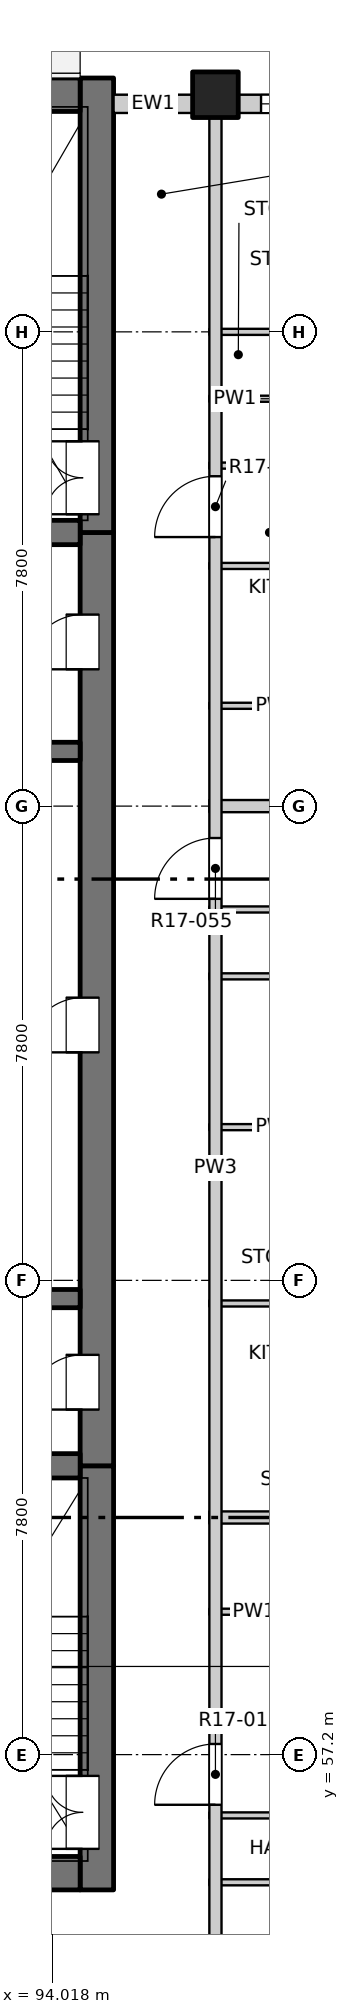
"""IFC4 building model, lengths in metres.
Left out: names, types, materials, properties, quantities, classifications, styles, units other than length and angle.
Written with IfcOpenShell. Run it as: python <this file> out.ifc"""

import sys

from ifc_helpers import new_model, si_unit, direction, frame, frame_2d, origin, origin_2d, place, context, subcontext, project, spatial, rectangle, extrude, element, fill, save


model = new_model("IFC4")
c1 = context("Model", 3, precision=1e-05, world=origin(), true_north=direction((0.0, 1.0)))
c2 = subcontext(c1, "Body", "Model", "MODEL_VIEW")
j1 = project(units=[si_unit("LENGTHUNIT", "METRE"), si_unit("PLANEANGLEUNIT", "RADIAN")], contexts=[c1])
p1 = place(None, origin())
s1 = spatial("IfcSite", under=j1, at=p1, CompositionType="ELEMENT")
p2 = place(p1, origin())
s2 = spatial("IfcBuilding", under=s1, at=p2, CompositionType="ELEMENT")
p3 = place(p2, frame((0.0, 0.0, 182.6)))
s3 = spatial("IfcBuildingStorey", under=s2, at=p3, CompositionType="ELEMENT", Elevation=182.6)
p4 = place(p3, frame((96.7, 84.5, -0.25), z_axis=(0.0, 0.0, 1.0), x_axis=(1.0, 0.0, 0.0)))
e1 = element("IfcColumn", 1, at=p4, inside=s3, PredefinedType="COLUMN", context=c2, shape_type="SweptSolid", body=[
    extrude(rectangle(XDim=0.75, YDim=0.75, at=origin_2d()), origin(), (0.0, 0.0, 1.0), 3.4),
])
p5 = place(p3, frame((94.75, 54.975, -0.25), z_axis=(0.0, 0.0, 1.0), x_axis=(0.0, 1.0, 0.0)))
e2 = element("IfcWall", 2, at=p5, inside=s3, PredefinedType="SOLIDWALL", context=c2, shape_type="SweptSolid", body=[
    extrude(rectangle(XDim=6.975, YDim=0.55, at=frame_2d((3.487, 0.0))), origin(), (0.0, 0.0, 1.0), 3.4),
])
p6 = place(p5, frame((0.675, 0.0, 0.25)))
e3 = element("IfcOpeningElement", 3, at=p6, cuts=e2, PredefinedType="OPENING", context=c2, shape_type="SweptSolid", body=[
    extrude(rectangle(XDim=1.2, YDim=2.1, at=frame_2d((0.6, 1.05))), frame((0.0, 0.285, 0.0), z_axis=(0.0, -1.0, 0.0), x_axis=(1.0, 0.0, 0.0)), (0.0, 0.0, 1.0), 0.57),
])
p7 = place(p3, frame((94.75, 61.95, -0.25), z_axis=(0.0, 0.0, 1.0), x_axis=(0.0, 1.0, 0.0)))
e4 = element("IfcWall", 4, at=p7, inside=s3, PredefinedType="SOLIDWALL", context=c2, shape_type="SweptSolid", body=[
    extrude(rectangle(XDim=15.35, YDim=0.55, at=frame_2d((7.675, 0.0))), origin(), (0.0, 0.0, 1.0), 3.4),
])
p8 = place(p7, frame((0.925, 0.0, 0.25)))
e5 = element("IfcOpeningElement", 5, at=p8, cuts=e4, PredefinedType="OPENING", context=c2, shape_type="SweptSolid", body=[
    extrude(rectangle(XDim=0.9, YDim=2.1, at=frame_2d((0.45, 1.05))), frame((0.0, 0.285, 0.0), z_axis=(0.0, -1.0, 0.0), x_axis=(1.0, 0.0, 0.0)), (0.0, 0.0, 1.0), 0.57),
])
p9 = place(p7, frame((6.8, 0.0, 0.25)))
e6 = element("IfcOpeningElement", 6, at=p9, cuts=e4, PredefinedType="OPENING", context=c2, shape_type="SweptSolid", body=[
    extrude(rectangle(XDim=0.9, YDim=2.1, at=frame_2d((0.45, 1.05))), frame((0.0, 0.285, 0.0), z_axis=(0.0, -1.0, 0.0), x_axis=(1.0, 0.0, 0.0)), (0.0, 0.0, 1.0), 0.57),
])
p10 = place(p7, frame((13.1, 0.0, 0.25)))
e7 = element("IfcOpeningElement", 7, at=p10, cuts=e4, PredefinedType="OPENING", context=c2, shape_type="SweptSolid", body=[
    extrude(rectangle(XDim=0.9, YDim=2.1, at=frame_2d((0.45, 1.05))), frame((0.0, 0.285, 0.0), z_axis=(0.0, -1.0, 0.0), x_axis=(1.0, 0.0, 0.0)), (0.0, 0.0, 1.0), 0.57),
])
p11 = place(p3, frame((94.75, 77.3, -0.25), z_axis=(0.0, 0.0, 1.0), x_axis=(0.0, 1.0, 0.0)))
e8 = element("IfcWall", 8, at=p11, inside=s3, PredefinedType="SOLIDWALL", context=c2, shape_type="SweptSolid", body=[
    extrude(rectangle(XDim=7.475, YDim=0.55, at=frame_2d((3.737, 0.0))), origin(), (0.0, 0.0, 1.0), 3.4),
])
p12 = place(p11, frame((0.3, 0.0, 0.25)))
e9 = element("IfcOpeningElement", 9, at=p12, cuts=e8, PredefinedType="OPENING", context=c2, shape_type="SweptSolid", body=[
    extrude(rectangle(XDim=1.2, YDim=2.1, at=frame_2d((0.6, 1.05))), frame((0.0, 0.285, 0.0), z_axis=(0.0, -1.0, 0.0), x_axis=(1.0, 0.0, 0.0)), (0.0, 0.0, 1.0), 0.57),
])
p13 = place(p3, frame((75.525, 55.25, -0.25), z_axis=(0.0, 0.0, 1.0), x_axis=(1.0, 0.0, 0.0)))
e10 = element("IfcWall", 10, at=p13, inside=s3, PredefinedType="SOLIDWALL", context=c2, shape_type="SweptSolid", body=[
    extrude(rectangle(XDim=18.95, YDim=0.55, at=frame_2d((9.475, 0.0))), origin(), (0.0, 0.0, 1.0), 3.4),
])
p14 = place(p13, frame((8.725, 0.0, 0.25)))
e11 = element("IfcOpeningElement", 11, at=p14, cuts=e10, PredefinedType="OPENING", context=c2, shape_type="SweptSolid", body=[
    extrude(rectangle(XDim=1.5, YDim=2.1, at=frame_2d((0.75, 1.05))), frame((0.0, 0.285, 0.0), z_axis=(0.0, -1.0, 0.0), x_axis=(1.0, 0.0, 0.0)), (0.0, 0.0, 1.0), 0.57),
])
p15 = place(p3, frame((75.525, 84.5, -0.25), z_axis=(0.0, 0.0, 1.0), x_axis=(1.0, 0.0, 0.0)))
e12 = element("IfcWall", 12, at=p15, inside=s3, PredefinedType="SOLIDWALL", context=c2, shape_type="SweptSolid", body=[
    extrude(rectangle(XDim=18.95, YDim=0.55, at=frame_2d((9.475, 0.0))), origin(), (0.0, 0.0, 1.0), 3.4),
])
p16 = place(p3, frame((90.7, 61.95, -0.25), z_axis=(0.0, 0.0, 1.0), x_axis=(1.0, 0.0, 0.0)))
e13 = element("IfcWall", 13, at=p16, inside=s3, PredefinedType="SOLIDWALL", context=c2, shape_type="SweptSolid", body=[
    extrude(rectangle(XDim=3.775, YDim=0.4, at=frame_2d((1.888, 0.0))), origin(), (0.0, 0.0, 1.0), 3.4),
])
for number, where, z_axis, x_axis in (
    (14, (90.7, 64.7, -0.25), (0.0, 0.0, 1.0), (1.0, 0.0, 0.0)),
    (15, (90.7, 73.7, -0.25), (0.0, 0.0, 1.0), (1.0, 0.0, 0.0)),
):
    element("IfcWall", number, at=place(p3, frame(where, z_axis=z_axis, x_axis=x_axis)), inside=s3, PredefinedType="SOLIDWALL", context=c2, shape_type="SweptSolid", body=[
        extrude(rectangle(XDim=3.775, YDim=0.3, at=frame_2d((1.888, 0.0))), origin(), (0.0, 0.0, 1.0), 3.4),
    ])
p17 = place(p3, frame((90.7, 77.3, -0.25), z_axis=(0.0, 0.0, 1.0), x_axis=(1.0, 0.0, 0.0)))
e16 = element("IfcWall", 16, at=p17, inside=s3, PredefinedType="SOLIDWALL", context=c2, shape_type="SweptSolid", body=[
    extrude(rectangle(XDim=3.775, YDim=0.4, at=frame_2d((1.888, 0.0))), origin(), (0.0, 0.0, 1.0), 3.4),
])
p18 = place(p3, frame((95.025, 84.35, 0.0), z_axis=(0.0, 0.0, 1.0), x_axis=(1.0, 0.0, 0.0)))
e17 = element("IfcWall", 17, at=p18, inside=s3, PredefinedType="SOLIDWALL", context=c2, shape_type="SweptSolid", body=[
    extrude(rectangle(XDim=1.3, YDim=0.3, at=frame_2d((0.65, 0.0))), origin(), (0.0, 0.0, 1.0), 2.7),
])
p19 = place(p3, frame((97.075, 84.35, 0.0), z_axis=(0.0, 0.0, 1.0), x_axis=(1.0, 0.0, 0.0)))
e18 = element("IfcWall", 18, at=p19, inside=s3, PredefinedType="SOLIDWALL", context=c2, shape_type="SweptSolid", body=[
    extrude(rectangle(XDim=3.525, YDim=0.3, at=frame_2d((1.763, 0.0))), origin(), (0.0, 0.0, 1.0), 2.7),
])
p20 = place(p19, frame((0.375, 0.0, 0.9)))
e19 = element("IfcOpeningElement", 19, at=p20, cuts=e18, PredefinedType="OPENING", context=c2, shape_type="SweptSolid", body=[
    extrude(rectangle(XDim=2.4, YDim=1.8, at=frame_2d((1.2, 0.9))), frame((0.0, 0.16, 0.0), z_axis=(0.0, -1.0, 0.0), x_axis=(1.0, 0.0, 0.0)), (0.0, 0.0, 1.0), 0.32),
])
for number, where, z_axis, x_axis in (
    (20, (96.6, 55.1, 0.0), (0.0, 0.0, 1.0), (1.0, 0.0, 0.0)),
    (21, (96.6, 56.2, 0.0), (0.0, 0.0, 1.0), (1.0, 0.0, 0.0)),
    (22, (96.6, 57.75, 0.0), (0.0, 0.0, 1.0), (1.0, 0.0, 0.0)),
    (23, (96.6, 59.55, 0.0), (0.0, 0.0, 1.0), (1.0, 0.0, 0.0)),
):
    element("IfcWall", number, at=place(p3, frame(where, z_axis=z_axis, x_axis=x_axis)), inside=s3, PredefinedType="PARTITIONING", context=c2, shape_type="SweptSolid", body=[
        extrude(rectangle(XDim=2.22, YDim=0.1, at=frame_2d((1.11, 0.0))), origin(), (0.0, 0.0, 1.0), 3.15),
    ])
p21 = place(p3, frame((96.6, 61.1, 0.0), z_axis=(0.0, 0.0, 1.0), x_axis=(1.0, 0.0, 0.0)))
e24 = element("IfcWall", 24, at=p21, inside=s3, PredefinedType="PARTITIONING", context=c2, shape_type="SweptSolid", body=[
    extrude(rectangle(XDim=7.6, YDim=0.2, at=frame_2d((3.8, 0.0))), origin(), (0.0, 0.0, 1.0), 2.55),
])
for number, where, z_axis, x_axis in (
    (25, (96.6, 64.62, 0.0), (0.0, 0.0, 1.0), (1.0, 0.0, 0.0)),
    (26, (96.6, 67.52, 0.0), (0.0, 0.0, 1.0), (1.0, 0.0, 0.0)),
    (27, (96.6, 70.0, 0.0), (0.0, 0.0, 1.0), (1.0, 0.0, 0.0)),
    (28, (96.6, 71.1, 0.0), (0.0, 0.0, 1.0), (1.0, 0.0, 0.0)),
):
    element("IfcWall", number, at=place(p3, frame(where, z_axis=z_axis, x_axis=x_axis)), inside=s3, PredefinedType="PARTITIONING", context=c2, shape_type="SweptSolid", body=[
        extrude(rectangle(XDim=2.22, YDim=0.1, at=frame_2d((1.11, 0.0))), origin(), (0.0, 0.0, 1.0), 3.15),
    ])
p22 = place(p3, frame((96.6, 72.8, 0.0), z_axis=(0.0, 0.0, 1.0), x_axis=(1.0, 0.0, 0.0)))
e29 = element("IfcWall", 29, at=p22, inside=s3, PredefinedType="PARTITIONING", context=c2, shape_type="SweptSolid", body=[
    extrude(rectangle(XDim=7.6, YDim=0.2, at=frame_2d((3.8, 0.0))), origin(), (0.0, 0.0, 1.0), 3.15),
])
p23 = place(p3, frame((96.6, 74.45, 0.0), z_axis=(0.0, 0.0, 1.0), x_axis=(1.0, 0.0, 0.0)))
e30 = element("IfcWall", 30, at=p23, inside=s3, PredefinedType="PARTITIONING", context=c2, shape_type="SweptSolid", body=[
    extrude(rectangle(XDim=2.22, YDim=0.1, at=frame_2d((1.11, 0.0))), origin(), (0.0, 0.0, 1.0), 3.15),
])
p24 = place(p3, frame((96.6, 76.75, 0.0), z_axis=(0.0, 0.0, 1.0), x_axis=(1.0, 0.0, 0.0)))
e31 = element("IfcWall", 31, at=p24, inside=s3, PredefinedType="PARTITIONING", context=c2, shape_type="SweptSolid", body=[
    extrude(rectangle(XDim=2.22, YDim=0.1, at=frame_2d((1.11, 0.0))), origin(), (0.0, 0.0, 1.0), 2.55),
])
for number, where, z_axis, x_axis in (
    (32, (96.6, 78.4, 0.0), (0.0, 0.0, 1.0), (1.0, 0.0, 0.0)),
    (33, (96.6, 79.5, 0.0), (0.0, 0.0, 1.0), (1.0, 0.0, 0.0)),
):
    element("IfcWall", number, at=place(p3, frame(where, z_axis=z_axis, x_axis=x_axis)), inside=s3, PredefinedType="PARTITIONING", context=c2, shape_type="SweptSolid", body=[
        extrude(rectangle(XDim=2.22, YDim=0.1, at=frame_2d((1.11, 0.0))), origin(), (0.0, 0.0, 1.0), 3.15),
    ])
p25 = place(p3, frame((96.6, 80.6, 0.0), z_axis=(0.0, 0.0, 1.0), x_axis=(1.0, 0.0, 0.0)))
e34 = element("IfcWall", 34, at=p25, inside=s3, PredefinedType="PARTITIONING", context=c2, shape_type="SweptSolid", body=[
    extrude(rectangle(XDim=7.6, YDim=0.1, at=frame_2d((3.8, 0.0))), origin(), (0.0, 0.0, 1.0), 3.15),
])
p26 = place(p25, frame((2.56, 0.0, 0.0)))
e35 = element("IfcOpeningElement", 35, at=p26, cuts=e34, PredefinedType="OPENING", context=c2, shape_type="SweptSolid", body=[
    extrude(rectangle(XDim=0.9, YDim=2.1, at=frame_2d((0.45, 1.05))), frame((0.0, 0.06, 0.0), z_axis=(0.0, -1.0, 0.0), x_axis=(1.0, 0.0, 0.0)), (0.0, 0.0, 1.0), 0.12),
])
p27 = place(p3, frame((96.7, 49.5, 0.0), z_axis=(0.0, 0.0, 1.0), x_axis=(0.0, 1.0, 0.0)))
e36 = element("IfcWall", 36, at=p27, inside=s3, PredefinedType="PARTITIONING", context=c2, shape_type="SweptSolid", body=[
    extrude(rectangle(XDim=34.7, YDim=0.2, at=frame_2d((17.35, 0.0))), origin(), (0.0, 0.0, 1.0), 3.15),
])
p28 = place(p27, frame((6.875, 0.0, 0.0)))
e37 = element("IfcOpeningElement", 37, at=p28, cuts=e36, PredefinedType="OPENING", context=c2, shape_type="SweptSolid", body=[
    extrude(rectangle(XDim=1.0, YDim=2.1, at=frame_2d((0.5, 1.05))), frame((0.0, 0.11, 0.0), z_axis=(0.0, -1.0, 0.0), x_axis=(1.0, 0.0, 0.0)), (0.0, 0.0, 1.0), 0.22),
])
p29 = place(p27, frame((21.775, 0.0, 0.0)))
e38 = element("IfcOpeningElement", 38, at=p29, cuts=e36, PredefinedType="OPENING", context=c2, shape_type="SweptSolid", body=[
    extrude(rectangle(XDim=1.0, YDim=2.1, at=frame_2d((0.5, 1.05))), frame((0.0, 0.11, 0.0), z_axis=(0.0, -1.0, 0.0), x_axis=(1.0, 0.0, 0.0)), (0.0, 0.0, 1.0), 0.22),
])
p30 = place(p27, frame((27.725, 0.0, 0.0)))
e39 = element("IfcOpeningElement", 39, at=p30, cuts=e36, PredefinedType="OPENING", context=c2, shape_type="SweptSolid", body=[
    extrude(rectangle(XDim=1.0, YDim=2.1, at=frame_2d((0.5, 1.05))), frame((0.0, 0.11, 0.0), z_axis=(0.0, -1.0, 0.0), x_axis=(1.0, 0.0, 0.0)), (0.0, 0.0, 1.0), 0.22),
])
p31 = place(p20, origin())
e40 = element("IfcWindow", 40, at=p31, inside=s3, PartitioningType="DOUBLE_PANEL_VERTICAL", PredefinedType="WINDOW", context=c2, shape_type="SweptSolid", body=[
    extrude(rectangle(XDim=2.4, YDim=1.8, at=frame_2d((1.2, 0.9))), frame((0.0, 0.03, 0.0), z_axis=(0.0, -1.0, 0.0), x_axis=(1.0, 0.0, 0.0)), (0.0, 0.0, 1.0), 0.06),
])
fill(e19, e40)
p32 = place(p6, origin())
e41 = element("IfcDoor", 41, at=p32, inside=s3, OperationType="DOUBLE_DOOR_SINGLE_SWING", PredefinedType="DOOR", context=c2, shape_type="SweptSolid", body=[
    extrude(rectangle(XDim=1.2, YDim=2.1, at=frame_2d((0.6, 1.05))), frame((0.0, 0.26, 0.0), z_axis=(0.0, -1.0, 0.0), x_axis=(1.0, 0.0, 0.0)), (0.0, 0.0, 1.0), 0.05),
])
fill(e3, e41)
p33 = place(p28, origin())
e42 = element("IfcDoor", 42, at=p33, inside=s3, OperationType="SINGLE_SWING_LEFT", PredefinedType="DOOR", context=c2, shape_type="SweptSolid", body=[
    extrude(rectangle(XDim=1.0, YDim=2.1, at=frame_2d((0.5, 1.05))), frame((0.0, 0.025, 0.0), z_axis=(0.0, -1.0, 0.0), x_axis=(1.0, 0.0, 0.0)), (0.0, 0.0, 1.0), 0.05),
])
fill(e37, e42)
p34 = place(p8, origin())
e43 = element("IfcDoor", 43, at=p34, inside=s3, OperationType="SINGLE_SWING_LEFT", PredefinedType="DOOR", context=c2, shape_type="SweptSolid", body=[
    extrude(rectangle(XDim=0.9, YDim=2.1, at=frame_2d((0.45, 1.05))), frame((0.0, 0.26, 0.0), z_axis=(0.0, -1.0, 0.0), x_axis=(1.0, 0.0, 0.0)), (0.0, 0.0, 1.0), 0.05),
])
fill(e5, e43)
p35 = place(p9, origin())
e44 = element("IfcDoor", 44, at=p35, inside=s3, OperationType="SINGLE_SWING_LEFT", PredefinedType="DOOR", context=c2, shape_type="SweptSolid", body=[
    extrude(rectangle(XDim=0.9, YDim=2.1, at=frame_2d((0.45, 1.05))), frame((0.0, 0.26, 0.0), z_axis=(0.0, -1.0, 0.0), x_axis=(1.0, 0.0, 0.0)), (0.0, 0.0, 1.0), 0.05),
])
fill(e6, e44)
p36 = place(p29, origin())
e45 = element("IfcDoor", 45, at=p36, inside=s3, OperationType="SINGLE_SWING_LEFT", PredefinedType="DOOR", context=c2, shape_type="SweptSolid", body=[
    extrude(rectangle(XDim=1.0, YDim=2.1, at=frame_2d((0.5, 1.05))), frame((0.0, 0.025, 0.0), z_axis=(0.0, -1.0, 0.0), x_axis=(1.0, 0.0, 0.0)), (0.0, 0.0, 1.0), 0.05),
])
fill(e38, e45)
p37 = place(p10, origin())
e46 = element("IfcDoor", 46, at=p37, inside=s3, OperationType="SINGLE_SWING_LEFT", PredefinedType="DOOR", context=c2, shape_type="SweptSolid", body=[
    extrude(rectangle(XDim=0.9, YDim=2.1, at=frame_2d((0.45, 1.05))), frame((0.0, 0.26, 0.0), z_axis=(0.0, -1.0, 0.0), x_axis=(1.0, 0.0, 0.0)), (0.0, 0.0, 1.0), 0.05),
])
fill(e7, e46)
p38 = place(p30, origin())
e47 = element("IfcDoor", 47, at=p38, inside=s3, OperationType="SINGLE_SWING_RIGHT", PredefinedType="DOOR", context=c2, shape_type="SweptSolid", body=[
    extrude(rectangle(XDim=1.0, YDim=2.1, at=frame_2d((0.5, 1.05))), frame((0.0, 0.025, 0.0), z_axis=(0.0, -1.0, 0.0), x_axis=(1.0, 0.0, 0.0)), (0.0, 0.0, 1.0), 0.05),
])
fill(e39, e47)
p39 = place(p12, origin())
e48 = element("IfcDoor", 48, at=p39, inside=s3, OperationType="DOUBLE_DOOR_SINGLE_SWING", PredefinedType="DOOR", context=c2, shape_type="SweptSolid", body=[
    extrude(rectangle(XDim=1.2, YDim=2.1, at=frame_2d((0.6, 1.05))), frame((0.0, 0.26, 0.0), z_axis=(0.0, -1.0, 0.0), x_axis=(1.0, 0.0, 0.0)), (0.0, 0.0, 1.0), 0.05),
])
fill(e9, e48)
save(model, sys.argv[1])
